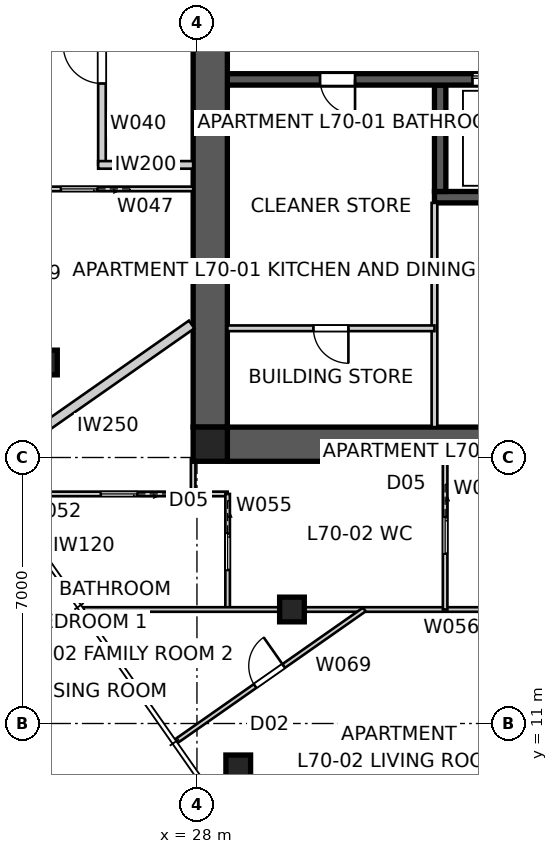
"""IFC4 building model, lengths in metres.
Left out: names, types, materials, properties, quantities, classifications, styles, units other than length and angle.
Written with IfcOpenShell. Run it as: python <this file> out.ifc"""

import sys

from ifc_helpers import new_model, si_unit, direction, frame, frame_2d, origin, origin_2d, place, context, subcontext, project, spatial, polyline, rectangle, outline, extrude, element, fill, save


model = new_model("IFC4")
c1 = context("Model", 3, precision=1e-05, world=origin(), true_north=direction((0.0, 1.0)))
c2 = subcontext(c1, "Body", "Model", "MODEL_VIEW")
j1 = project(units=[si_unit("LENGTHUNIT", "METRE"), si_unit("PLANEANGLEUNIT", "RADIAN")], contexts=[c1])
p1 = place(None, origin())
s1 = spatial("IfcSite", under=j1, at=p1, CompositionType="ELEMENT")
p2 = place(p1, origin())
s2 = spatial("IfcBuilding", under=s1, at=p2, CompositionType="ELEMENT")
p3 = place(p2, frame((0.0, 0.0, 254.0)))
s3 = spatial("IfcBuildingStorey", under=s2, at=p3, CompositionType="ELEMENT", Elevation=254.0)
p4 = place(p3, frame((51.2, 18.35, 0.0), z_axis=(0.0, 0.0, 1.0), x_axis=(-1.0, 0.0, 0.0)))
e1 = element("IfcWall", 1, at=p4, inside=s3, PredefinedType="SHEAR", context=c2, shape_type="SweptSolid", body=[
    extrude(outline(polyline([(0.0, -0.45), (22.4, -0.45), (22.4, -0.025), (22.85, -0.025), (22.85, 0.025), (22.4, 0.025), (22.4, 0.45), (0.0, 0.45), (0.0, 0.025), (-0.45, 0.025), (-0.45, -0.025), (0.0, -0.025), (0.0, -0.45)])), origin(), (0.0, 0.0, 1.0), 3.4),
])
p5 = place(p3, frame((28.35, 41.2, 0.0), z_axis=(0.0, 0.0, 1.0), x_axis=(0.0, -1.0, 0.0)))
e2 = element("IfcWall", 2, at=p5, inside=s3, PredefinedType="SHEAR", context=c2, shape_type="SweptSolid", body=[
    extrude(outline(polyline([(0.0, -0.45), (22.4, -0.45), (22.4, -0.025), (22.85, -0.025), (22.85, 0.025), (22.4, 0.025), (22.4, 0.45), (0.0, 0.45), (0.0, 0.025), (-0.45, 0.025), (-0.45, -0.025), (0.0, -0.025), (0.0, -0.45)])), origin(), (0.0, 0.0, 1.0), 3.4),
])
p6 = place(p5, frame((11.14, 0.0, 0.0)))
e3 = element("IfcOpeningElement", 3, at=p6, cuts=e2, PredefinedType="OPENING", context=c2, shape_type="SweptSolid", body=[
    extrude(rectangle(XDim=1.02, YDim=2.4, at=frame_2d((0.51, 1.2))), frame((0.0, 0.46, 0.0), z_axis=(0.0, -1.0, 0.0), x_axis=(1.0, 0.0, 0.0)), (0.0, 0.0, 1.0), 0.92),
])
p7 = place(p3, frame((51.2, 27.95, 0.0), z_axis=(0.0, 0.0, 1.0), x_axis=(-1.0, 0.0, 0.0)))
e4 = element("IfcWall", 4, at=p7, inside=s3, PredefinedType="SHEAR", context=c2, shape_type="SweptSolid", body=[
    extrude(rectangle(XDim=22.4, YDim=0.3, at=frame_2d((11.2, 0.0))), origin(), (0.0, 0.0, 1.0), 3.4),
])
p8 = place(p7, frame((19.04, 0.0, 0.0)))
e5 = element("IfcOpeningElement", 5, at=p8, cuts=e4, PredefinedType="OPENING", context=c2, shape_type="SweptSolid", body=[
    extrude(rectangle(XDim=0.92, YDim=2.1, at=frame_2d((0.46, 1.05))), frame((0.0, 0.16, 0.0), z_axis=(0.0, -1.0, 0.0), x_axis=(1.0, 0.0, 0.0)), (0.0, 0.0, 1.0), 0.32),
])
p9 = place(p7, frame((1.265, 0.0, 0.0)))
e6 = element("IfcOpeningElement", 6, at=p9, cuts=e4, PredefinedType="OPENING", context=c2, shape_type="SweptSolid", body=[
    extrude(rectangle(XDim=1.02, YDim=2.1, at=frame_2d((0.51, 1.05))), frame((0.0, 0.16, 0.0), z_axis=(0.0, -1.0, 0.0), x_axis=(1.0, 0.0, 0.0)), (0.0, 0.0, 1.0), 0.32),
])
p10 = place(p7, frame((4.015, 0.0, 0.0)))
e7 = element("IfcOpeningElement", 7, at=p10, cuts=e4, PredefinedType="OPENING", context=c2, shape_type="SweptSolid", body=[
    extrude(rectangle(XDim=0.92, YDim=2.1, at=frame_2d((0.46, 1.05))), frame((0.0, 0.16, 0.0), z_axis=(0.0, -1.0, 0.0), x_axis=(1.0, 0.0, 0.0)), (0.0, 0.0, 1.0), 0.32),
])
p11 = place(p7, frame((9.34, 0.0, 0.0)))
e8 = element("IfcOpeningElement", 8, at=p11, cuts=e4, PredefinedType="OPENING", context=c2, shape_type="SweptSolid", body=[
    extrude(rectangle(XDim=0.92, YDim=2.1, at=frame_2d((0.46, 1.05))), frame((0.0, 0.16, 0.0), z_axis=(0.0, -1.0, 0.0), x_axis=(1.0, 0.0, 0.0)), (0.0, 0.0, 1.0), 0.32),
])
p12 = place(p7, frame((7.015, 0.0, 0.0)))
e9 = element("IfcOpeningElement", 9, at=p12, cuts=e4, PredefinedType="OPENING", context=c2, shape_type="SweptSolid", body=[
    extrude(rectangle(XDim=0.92, YDim=2.1, at=frame_2d((0.46, 1.05))), frame((0.0, 0.16, 0.0), z_axis=(0.0, -1.0, 0.0), x_axis=(1.0, 0.0, 0.0)), (0.0, 0.0, 1.0), 0.32),
])
p13 = place(p7, frame((12.05, 0.0, 0.0)))
e10 = element("IfcOpeningElement", 10, at=p13, cuts=e4, PredefinedType="OPENING", context=c2, shape_type="SweptSolid", body=[
    extrude(rectangle(XDim=1.1, YDim=2.1, at=frame_2d((0.55, 1.05))), frame((0.0, 0.16, 0.0), z_axis=(0.0, -1.0, 0.0), x_axis=(1.0, 0.0, 0.0)), (0.0, 0.0, 1.0), 0.32),
])
p14 = place(p7, frame((14.85, 0.0, 0.0)))
e11 = element("IfcOpeningElement", 11, at=p14, cuts=e4, PredefinedType="OPENING", context=c2, shape_type="SweptSolid", body=[
    extrude(rectangle(XDim=1.1, YDim=2.1, at=frame_2d((0.55, 1.05))), frame((0.0, 0.16, 0.0), z_axis=(0.0, -1.0, 0.0), x_axis=(1.0, 0.0, 0.0)), (0.0, 0.0, 1.0), 0.32),
])
p15 = place(p3, frame((45.75, 24.85, 0.0), z_axis=(0.0, 0.0, 1.0), x_axis=(-1.0, 0.0, 0.0)))
e12 = element("IfcWall", 12, at=p15, inside=s3, PredefinedType="SHEAR", context=c2, shape_type="SweptSolid", body=[
    extrude(rectangle(XDim=11.5, YDim=0.3, at=frame_2d((5.75, 0.0))), origin(), (0.0, 0.0, 1.0), 3.4),
])
p16 = place(p3, frame((34.4, 27.8, 0.0), z_axis=(0.0, 0.0, 1.0), x_axis=(0.0, -1.0, 0.0)))
e13 = element("IfcWall", 13, at=p16, inside=s3, PredefinedType="SHEAR", context=c2, shape_type="SweptSolid", body=[
    extrude(rectangle(XDim=2.8, YDim=0.3, at=frame_2d((1.4, 0.0))), origin(), (0.0, 0.0, 1.0), 3.4),
])
p17 = place(p3, frame((28.35, 18.35, 0.0), z_axis=(0.0, 0.0, 1.0), x_axis=(1.0, 0.0, 0.0)))
e14 = element("IfcColumn", 14, at=p17, inside=s3, PredefinedType="COLUMN", context=c2, shape_type="SweptSolid", body=[
    extrude(rectangle(XDim=0.9, YDim=0.9, at=origin_2d()), origin(), (0.0, 0.0, 1.0), 3.4),
])
for number, where, z_axis, x_axis in (
    (15, (29.086, 9.845, 0.0), (0.0, 0.0, 1.0), (1.0, 0.0, 0.0)),
    (16, (24.0, 20.5, 0.0), (0.0, 0.0, 1.0), (1.0, 0.0, 0.0)),
    (17, (30.5, 14.0, 0.0), (0.0, 0.0, 1.0), (1.0, 0.0, 0.0)),
):
    element("IfcColumn", number, at=place(p3, frame(where, z_axis=z_axis, x_axis=x_axis)), inside=s3, PredefinedType="COLUMN", context=c2, shape_type="SweptSolid", body=[
        extrude(rectangle(XDim=0.65, YDim=0.65, at=origin_2d()), origin(), (0.0, 0.0, 1.0), 3.4),
    ])
p18 = place(p3, frame((25.5, 25.7, 0.0), z_axis=(0.0, 0.0, 1.0), x_axis=(0.0, 1.0, 0.0)))
e18 = element("IfcWall", 18, at=p18, inside=s3, PredefinedType="PARTITIONING", context=c2, shape_type="SweptSolid", body=[
    extrude(rectangle(XDim=8.6, YDim=0.2, at=frame_2d((4.3, 0.0))), origin(), (0.0, 0.0, 1.0), 3.25),
])
p19 = place(p18, frame((2.142, 0.0, 0.0)))
e19 = element("IfcOpeningElement", 19, at=p19, cuts=e18, PredefinedType="OPENING", context=c2, shape_type="SweptSolid", body=[
    extrude(rectangle(XDim=1.02, YDim=2.34, at=frame_2d((0.51, 1.17))), frame((0.0, 0.11, 0.0), z_axis=(0.0, -1.0, 0.0), x_axis=(1.0, 0.0, 0.0)), (0.0, 0.0, 1.0), 0.22),
])
p20 = place(p18, frame((6.037, 0.0, 0.0)))
e20 = element("IfcOpeningElement", 20, at=p20, cuts=e18, PredefinedType="OPENING", context=c2, shape_type="SweptSolid", body=[
    extrude(rectangle(XDim=1.02, YDim=2.34, at=frame_2d((0.51, 1.17))), frame((0.0, 0.11, 0.0), z_axis=(0.0, -1.0, 0.0), x_axis=(1.0, 0.0, 0.0)), (0.0, 0.0, 1.0), 0.22),
])
p21 = place(p3, frame((27.9, 25.7, 0.0), z_axis=(0.0, 0.0, 1.0), x_axis=(-1.0, 0.0, 0.0)))
e21 = element("IfcWall", 21, at=p21, inside=s3, PredefinedType="PARTITIONING", context=c2, shape_type="SweptSolid", body=[
    extrude(rectangle(XDim=2.5, YDim=0.2, at=frame_2d((1.25, 0.0))), origin(), (0.0, 0.0, 1.0), 3.25),
])
p22 = place(p3, frame((22.388, 17.668, 0.0), z_axis=(0.0, 0.0, 1.0), x_axis=(0.819161528122, 0.573562891796, 0.0)))
e22 = element("IfcWall", 22, at=p22, inside=s3, PredefinedType="PARTITIONING", context=c2, shape_type="SweptSolid", body=[
    extrude(rectangle(XDim=6.681, YDim=0.25, at=frame_2d((3.341, 0.0))), origin(), (0.0, 0.0, 1.0), 3.25),
])
p23 = place(p3, frame((17.369, 24.836, 0.0), z_axis=(0.0, 0.0, 1.0), x_axis=(0.81915902312, 0.573566469418, 0.0)))
e23 = element("IfcWall", 23, at=p23, inside=s3, PredefinedType="PARTITIONING", context=c2, shape_type="SweptSolid", body=[
    extrude(rectangle(XDim=9.756, YDim=0.25, at=frame_2d((4.878, 0.0))), origin(), (0.0, 0.0, 1.0), 3.25),
])
p24 = place(p3, frame((34.25, 18.8, 0.0), z_axis=(0.0, 0.0, 1.0), x_axis=(0.0, 1.0, 0.0)))
e24 = element("IfcWall", 24, at=p24, inside=s3, PredefinedType="SOLIDWALL", context=c2, shape_type="SweptSolid", body=[
    extrude(rectangle(XDim=5.9, YDim=0.15, at=frame_2d((2.95, 0.0))), origin(), (0.0, 0.0, 1.0), 3.25),
])
p25 = place(p3, frame((34.25, 21.4, 0.0), z_axis=(0.0, 0.0, 1.0), x_axis=(-1.0, 0.0, 0.0)))
e25 = element("IfcWall", 25, at=p25, inside=s3, PredefinedType="SOLIDWALL", context=c2, shape_type="SweptSolid", body=[
    extrude(rectangle(XDim=5.45, YDim=0.15, at=frame_2d((2.725, 0.0))), origin(), (0.0, 0.0, 1.0), 3.25),
])
p26 = place(p25, frame((2.265, 0.0, 0.0)))
e26 = element("IfcOpeningElement", 26, at=p26, cuts=e25, PredefinedType="OPENING", context=c2, shape_type="SweptSolid", body=[
    extrude(rectangle(XDim=0.92, YDim=2.1, at=frame_2d((0.46, 1.05))), frame((0.0, 0.085, 0.0), z_axis=(0.0, -1.0, 0.0), x_axis=(1.0, 0.0, 0.0)), (0.0, 0.0, 1.0), 0.17),
])
p27 = place(p3, frame((27.9, 25.068, 0.0), z_axis=(0.0, 0.0, 1.0), x_axis=(-1.0, 0.0, 0.0)))
e27 = element("IfcWall", 27, at=p27, inside=s3, PredefinedType="PARTITIONING", context=c2, shape_type="SweptSolid", body=[
    extrude(rectangle(XDim=3.9, YDim=0.12, at=frame_2d((1.95, 0.0))), origin(), (0.0, 0.0, 1.0), 3.25),
])
p28 = place(p27, frame((2.52, 0.0, 0.0)))
e28 = element("IfcOpeningElement", 28, at=p28, cuts=e27, PredefinedType="OPENING", context=c2, shape_type="SweptSolid", body=[
    extrude(rectangle(XDim=0.96, YDim=2.1, at=frame_2d((0.48, 1.05))), frame((0.0, 0.07, 0.0), z_axis=(0.0, -1.0, 0.0), x_axis=(1.0, 0.0, 0.0)), (0.0, 0.0, 1.0), 0.14),
])
p29 = place(p3, frame((28.807, 17.041, 0.0), z_axis=(0.0, 0.0, 1.0), x_axis=(-1.0, 0.0, 0.0)))
e29 = element("IfcWall", 29, at=p29, inside=s3, PredefinedType="PARTITIONING", context=c2, shape_type="SweptSolid", body=[
    extrude(rectangle(XDim=4.807, YDim=0.12, at=frame_2d((2.404, 0.0))), origin(), (0.0, 0.0, 1.0), 3.25),
])
p30 = place(p29, frame((2.377, 0.0, 0.0)))
e30 = element("IfcOpeningElement", 30, at=p30, cuts=e29, PredefinedType="OPENING", context=c2, shape_type="SweptSolid", body=[
    extrude(rectangle(XDim=0.96, YDim=2.1, at=frame_2d((0.48, 1.05))), frame((0.0, 0.07, 0.0), z_axis=(0.0, -1.0, 0.0), x_axis=(1.0, 0.0, 0.0)), (0.0, 0.0, 1.0), 0.14),
])
p31 = place(p3, frame((27.9, 17.95, 0.0), z_axis=(0.0, 0.0, 1.0), x_axis=(0.0, -1.0, 0.0)))
e31 = element("IfcWall", 31, at=p31, inside=s3, PredefinedType="PARTITIONING", context=c2, shape_type="SweptSolid", body=[
    extrude(rectangle(XDim=0.909, YDim=0.12, at=frame_2d((0.454, 0.0))), origin(), (0.0, 0.0, 1.0), 3.25),
])
p32 = place(p3, frame((28.807, 17.041, 0.0), z_axis=(0.0, 0.0, 1.0), x_axis=(0.0, -1.0, 0.0)))
e32 = element("IfcWall", 32, at=p32, inside=s3, PredefinedType="PARTITIONING", context=c2, shape_type="SweptSolid", body=[
    extrude(rectangle(XDim=3.041, YDim=0.12, at=frame_2d((1.521, 0.0))), origin(), (0.0, 0.0, 1.0), 3.25),
])
p33 = place(p32, frame((1.041, 0.0, 0.0)))
e33 = element("IfcOpeningElement", 33, at=p33, cuts=e32, PredefinedType="OPENING", context=c2, shape_type="SweptSolid", body=[
    extrude(rectangle(XDim=0.96, YDim=2.1, at=frame_2d((0.48, 1.05))), frame((0.0, 0.07, 0.0), z_axis=(0.0, -1.0, 0.0), x_axis=(1.0, 0.0, 0.0)), (0.0, 0.0, 1.0), 0.14),
])
p34 = place(p3, frame((47.476, 14.0, 0.0), z_axis=(0.0, 0.0, 1.0), x_axis=(-1.0, 0.0, 0.0)))
e34 = element("IfcWall", 34, at=p34, inside=s3, PredefinedType="PARTITIONING", context=c2, shape_type="SweptSolid", body=[
    extrude(rectangle(XDim=22.471, YDim=0.12, at=frame_2d((11.235, 0.0))), origin(), (0.0, 0.0, 1.0), 2.549),
])
p35 = place(p34, frame((7.664, 0.0, 0.0)))
e35 = element("IfcOpeningElement", 35, at=p35, cuts=e34, PredefinedType="OPENING", context=c2, shape_type="SweptSolid", body=[
    extrude(rectangle(XDim=0.96, YDim=2.1, at=frame_2d((0.48, 1.05))), frame((0.0, 0.07, 0.0), z_axis=(0.0, -1.0, 0.0), x_axis=(1.0, 0.0, 0.0)), (0.0, 0.0, 1.0), 0.14),
])
p36 = place(p3, frame((34.53, 17.9, 0.0), z_axis=(0.0, 0.0, 1.0), x_axis=(0.0, -1.0, 0.0)))
e36 = element("IfcWall", 36, at=p36, inside=s3, PredefinedType="PARTITIONING", context=c2, shape_type="SweptSolid", body=[
    extrude(rectangle(XDim=3.9, YDim=0.12, at=frame_2d((1.95, 0.0))), origin(), (0.0, 0.0, 1.0), 3.25),
])
p37 = place(p36, frame((1.47, 0.0, 0.0)))
e37 = element("IfcOpeningElement", 37, at=p37, cuts=e36, PredefinedType="OPENING", context=c2, shape_type="SweptSolid", body=[
    extrude(rectangle(XDim=0.96, YDim=2.1, at=frame_2d((0.48, 1.05))), frame((0.0, 0.07, 0.0), z_axis=(0.0, -1.0, 0.0), x_axis=(1.0, 0.0, 0.0)), (0.0, 0.0, 1.0), 0.14),
])
p38 = place(p3, frame((41.528, 12.562, 0.0), z_axis=(0.0, 0.0, 1.0), x_axis=(-0.819146182185, -0.573584808212, 0.0)))
e38 = element("IfcWall", 38, at=p38, inside=s3, PredefinedType="PARTITIONING", context=c2, shape_type="SweptSolid", body=[
    extrude(rectangle(XDim=12.71, YDim=0.12, at=frame_2d((6.355, 0.0))), origin(), (0.0, 0.0, 1.0), 3.25),
])
p39 = place(p38, frame((8.077, 0.0, 0.0)))
e39 = element("IfcOpeningElement", 39, at=p39, cuts=e38, PredefinedType="OPENING", context=c2, shape_type="SweptSolid", body=[
    extrude(rectangle(XDim=0.92, YDim=2.34, at=frame_2d((0.46, 1.17))), frame((0.0, 0.07, 0.0), z_axis=(0.0, -1.0, 0.0), x_axis=(1.0, 0.0, 0.0)), (0.0, 0.0, 1.0), 0.14),
])
p40 = place(p38, frame((1.752, 0.0, 0.0)))
e40 = element("IfcOpeningElement", 40, at=p40, cuts=e38, PredefinedType="OPENING", context=c2, shape_type="SweptSolid", body=[
    extrude(rectangle(XDim=0.92, YDim=2.34, at=frame_2d((0.46, 1.17))), frame((0.0, 0.07, 0.0), z_axis=(0.0, -1.0, 0.0), x_axis=(1.0, 0.0, 0.0)), (0.0, 0.0, 1.0), 0.14),
])
p41 = place(p3, frame((27.44, 10.523, 0.0), z_axis=(0.0, 0.0, 1.0), x_axis=(0.81915432861, 0.573573173989, 0.0)))
e41 = element("IfcWall", 41, at=p41, inside=s3, PredefinedType="PARTITIONING", context=c2, shape_type="SweptSolid", body=[
    extrude(rectangle(XDim=6.061, YDim=0.12, at=frame_2d((3.031, 0.0))), origin(), (0.0, 0.0, 1.0), 3.25),
])
p42 = place(p41, frame((2.551, 0.0, 0.0)))
e42 = element("IfcOpeningElement", 42, at=p42, cuts=e41, PredefinedType="OPENING", context=c2, shape_type="SweptSolid", body=[
    extrude(rectangle(XDim=0.92, YDim=2.34, at=frame_2d((0.46, 1.17))), frame((0.0, 0.07, 0.0), z_axis=(0.0, -1.0, 0.0), x_axis=(1.0, 0.0, 0.0)), (0.0, 0.0, 1.0), 0.14),
])
p43 = place(p8, origin())
e43 = element("IfcDoor", 43, at=p43, inside=s3, OperationType="SINGLE_SWING_LEFT", PredefinedType="DOOR", context=c2, shape_type="SweptSolid", body=[
    extrude(rectangle(XDim=0.92, YDim=2.1, at=frame_2d((0.46, 1.05))), frame((0.0, 0.025, 0.0), z_axis=(0.0, -1.0, 0.0), x_axis=(1.0, 0.0, 0.0)), (0.0, 0.0, 1.0), 0.05),
])
fill(e5, e43)
p44 = place(p19, origin())
e44 = element("IfcDoor", 44, at=p44, inside=s3, OperationType="SINGLE_SWING_RIGHT", PredefinedType="DOOR", context=c2, shape_type="SweptSolid", body=[
    extrude(rectangle(XDim=1.02, YDim=2.34, at=frame_2d((0.51, 1.17))), frame((0.0, 0.025, 0.0), z_axis=(0.0, -1.0, 0.0), x_axis=(1.0, 0.0, 0.0)), (0.0, 0.0, 1.0), 0.05),
])
fill(e19, e44)
p45 = place(p26, origin())
e45 = element("IfcDoor", 45, at=p45, inside=s3, OperationType="SINGLE_SWING_LEFT", PredefinedType="DOOR", context=c2, shape_type="SweptSolid", body=[
    extrude(rectangle(XDim=0.92, YDim=2.1, at=frame_2d((0.46, 1.05))), frame((0.0, 0.025, 0.0), z_axis=(0.0, -1.0, 0.0), x_axis=(1.0, 0.0, 0.0)), (0.0, 0.0, 1.0), 0.05),
])
fill(e26, e45)
p46 = place(p28, origin())
e46 = element("IfcDoor", 46, at=p46, inside=s3, OperationType="SLIDING_TO_LEFT", PredefinedType="DOOR", context=c2, shape_type="SweptSolid", body=[
    extrude(rectangle(XDim=0.96, YDim=2.1, at=frame_2d((0.48, 1.05))), frame((0.0, 0.025, 0.0), z_axis=(0.0, -1.0, 0.0), x_axis=(1.0, 0.0, 0.0)), (0.0, 0.0, 1.0), 0.05),
])
fill(e28, e46)
p47 = place(p37, origin())
e47 = element("IfcDoor", 47, at=p47, inside=s3, OperationType="SLIDING_TO_LEFT", PredefinedType="DOOR", context=c2, shape_type="SweptSolid", body=[
    extrude(rectangle(XDim=0.96, YDim=2.1, at=frame_2d((0.48, 1.05))), frame((0.0, 0.025, 0.0), z_axis=(0.0, -1.0, 0.0), x_axis=(1.0, 0.0, 0.0)), (0.0, 0.0, 1.0), 0.05),
])
fill(e37, e47)
p48 = place(p42, origin())
e48 = element("IfcDoor", 48, at=p48, inside=s3, OperationType="SINGLE_SWING_RIGHT", PredefinedType="DOOR", context=c2, shape_type="SweptSolid", body=[
    extrude(rectangle(XDim=0.92, YDim=2.34, at=frame_2d((0.46, 1.17))), frame((0.0, 0.025, 0.0), z_axis=(0.0, -1.0, 0.0), x_axis=(1.0, 0.0, 0.0)), (0.0, 0.0, 1.0), 0.05),
])
fill(e42, e48)
p49 = place(p33, origin())
e49 = element("IfcDoor", 49, at=p49, inside=s3, OperationType="SLIDING_TO_LEFT", PredefinedType="DOOR", context=c2, shape_type="SweptSolid", body=[
    extrude(rectangle(XDim=0.96, YDim=2.1, at=frame_2d((0.48, 1.05))), frame((0.0, 0.025, 0.0), z_axis=(0.0, -1.0, 0.0), x_axis=(1.0, 0.0, 0.0)), (0.0, 0.0, 1.0), 0.05),
])
fill(e33, e49)
p50 = place(p30, origin())
e50 = element("IfcDoor", 50, at=p50, inside=s3, OperationType="SLIDING_TO_LEFT", PredefinedType="DOOR", context=c2, shape_type="SweptSolid", body=[
    extrude(rectangle(XDim=0.96, YDim=2.1, at=frame_2d((0.48, 1.05))), frame((0.0, 0.025, 0.0), z_axis=(0.0, -1.0, 0.0), x_axis=(1.0, 0.0, 0.0)), (0.0, 0.0, 1.0), 0.05),
])
fill(e30, e50)
p51 = place(p14, origin())
e51 = element("IfcDoor", 51, at=p51, inside=s3, OperationType="SLIDING_TO_LEFT", PredefinedType="DOOR", context=c2, shape_type="SweptSolid", body=[
    extrude(rectangle(XDim=1.1, YDim=2.1, at=frame_2d((0.55, 1.05))), frame((0.0, 0.025, 0.0), z_axis=(0.0, -1.0, 0.0), x_axis=(1.0, 0.0, 0.0)), (0.0, 0.0, 1.0), 0.05),
])
fill(e11, e51)
save(model, sys.argv[1])
